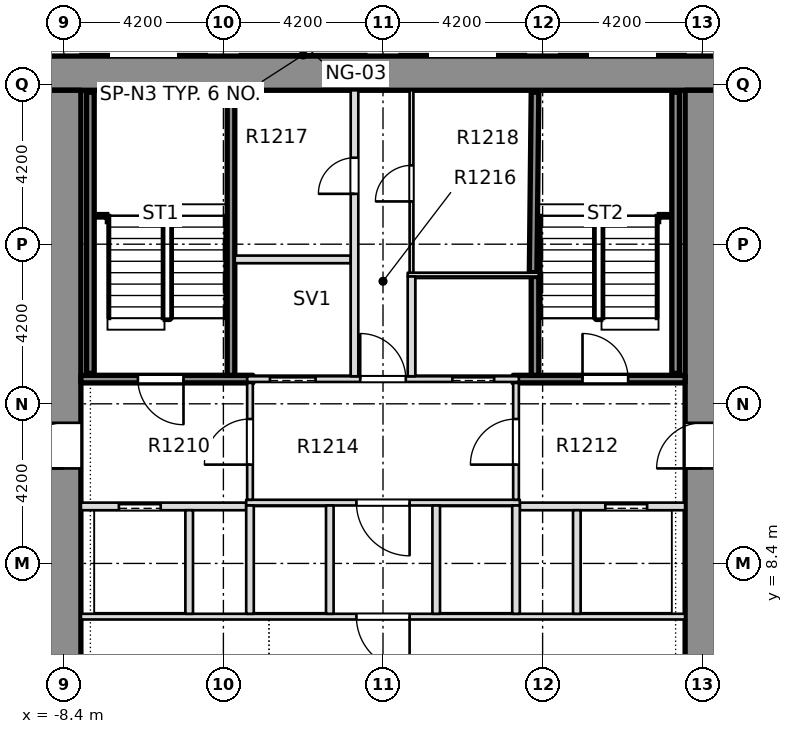
"""IFC4 building model, lengths in metres.
Left out: names, types, materials, properties, quantities, classifications, styles, units other than length and angle.
Written with IfcOpenShell. Run it as: python <this file> out.ifc"""

import sys

from ifc_helpers import new_model, si_unit, direction, frame, frame_2d, origin, place, context, subcontext, project, spatial, rectangle, extrude, element, fill, save


model = new_model("IFC4")
c1 = context("Model", 3, precision=1e-05, world=origin(), true_north=direction((0.0, 1.0)))
c2 = subcontext(c1, "Body", "Model", "MODEL_VIEW")
j1 = project(units=[si_unit("LENGTHUNIT", "METRE"), si_unit("PLANEANGLEUNIT", "RADIAN")], contexts=[c1])
p1 = place(None, origin())
s1 = spatial("IfcSite", under=j1, at=p1, CompositionType="ELEMENT")
p2 = place(p1, origin())
s2 = spatial("IfcBuilding", under=s1, at=p2, CompositionType="ELEMENT")
p3 = place(p2, frame((0.0, 0.0, 55.2)))
s3 = spatial("IfcBuildingStorey", under=s2, at=p3, CompositionType="ELEMENT", Elevation=55.2)
p4 = place(p3, frame((-11.7, 21.3, -0.32), z_axis=(0.0, 0.0, 1.0), x_axis=(1.0, 0.0, 0.0)))
e1 = element("IfcWall", 1, at=p4, inside=s3, PredefinedType="SOLIDWALL", context=c2, shape_type="SweptSolid", body=[
    extrude(rectangle(XDim=23.4, YDim=0.9, at=frame_2d((11.7, 0.0))), origin(), (0.0, 0.0, 1.0), 3.45),
])
p5 = place(p3, frame((-8.4, -7.5, -0.32), z_axis=(0.0, 0.0, 1.0), x_axis=(0.0, 1.0, 0.0)))
e2 = element("IfcWall", 2, at=p5, inside=s3, PredefinedType="SHEAR", context=c2, shape_type="SweptSolid", body=[
    extrude(rectangle(XDim=28.35, YDim=0.9, at=frame_2d((14.175, 0.0))), origin(), (0.0, 0.0, 1.0), 3.45),
])
p6 = place(p5, frame((18.4, 0.0, 0.32)))
e3 = element("IfcOpeningElement", 3, at=p6, cuts=e2, PredefinedType="OPENING", context=c2, shape_type="SweptSolid", body=[
    extrude(rectangle(XDim=1.2, YDim=2.1, at=frame_2d((0.6, 1.05))), frame((0.0, 0.46, 0.0), z_axis=(0.0, -1.0, 0.0), x_axis=(1.0, 0.0, 0.0)), (0.0, 0.0, 1.0), 0.92),
])
p7 = place(p3, frame((8.4, -7.5, -0.32), z_axis=(0.0, 0.0, 1.0), x_axis=(0.0, 1.0, 0.0)))
e4 = element("IfcWall", 4, at=p7, inside=s3, PredefinedType="SHEAR", context=c2, shape_type="SweptSolid", body=[
    extrude(rectangle(XDim=28.35, YDim=0.9, at=frame_2d((14.175, 0.0))), origin(), (0.0, 0.0, 1.0), 3.45),
])
p8 = place(p7, frame((18.4, 0.0, 0.32)))
e5 = element("IfcOpeningElement", 5, at=p8, cuts=e4, PredefinedType="OPENING", context=c2, shape_type="SweptSolid", body=[
    extrude(rectangle(XDim=1.2, YDim=2.1, at=frame_2d((0.6, 1.05))), frame((0.0, 0.46, 0.0), z_axis=(0.0, -1.0, 0.0), x_axis=(1.0, 0.0, 0.0)), (0.0, 0.0, 1.0), 0.92),
])
p9 = place(p3, frame((-7.949, 7.0, 0.0), z_axis=(0.0, 0.0, 1.0), x_axis=(1.0, 0.0, 0.0)))
e6 = element("IfcWall", 6, at=p9, inside=s3, PredefinedType="PARTITIONING", context=c2, shape_type="SweptSolid", body=[
    extrude(rectangle(XDim=15.898, YDim=0.15, at=frame_2d((7.949, 0.0))), origin(), (0.0, 0.0, 1.0), 3.13),
])
p10 = place(p9, frame((7.249, 0.0, 0.0)))
e7 = element("IfcOpeningElement", 7, at=p10, cuts=e6, PredefinedType="OPENING", context=c2, shape_type="SweptSolid", body=[
    extrude(rectangle(XDim=1.4, YDim=2.1, at=frame_2d((0.7, 1.05))), frame((0.0, 0.085, 0.0), z_axis=(0.0, -1.0, 0.0), x_axis=(1.0, 0.0, 0.0)), (0.0, 0.0, 1.0), 0.17),
])
p11 = place(p3, frame((-7.949, 9.9, 0.0), z_axis=(0.0, 0.0, 1.0), x_axis=(1.0, 0.0, 0.0)))
e8 = element("IfcWall", 8, at=p11, inside=s3, PredefinedType="PARTITIONING", context=c2, shape_type="SweptSolid", body=[
    extrude(rectangle(XDim=4.349, YDim=0.2, at=frame_2d((2.174, 0.0))), origin(), (0.0, 0.0, 1.0), 3.13),
])
p12 = place(p11, frame((0.999, 0.0, 0.0)))
e9 = element("IfcOpeningElement", 9, at=p12, cuts=e8, PredefinedType="OPENING", context=c2, shape_type="SweptSolid", body=[
    extrude(rectangle(XDim=1.1, YDim=2.1, at=frame_2d((0.55, 1.05))), frame((0.0, 0.11, 0.0), z_axis=(0.0, -1.0, 0.0), x_axis=(1.0, 0.0, 0.0)), (0.0, 0.0, 1.0), 0.22),
])
p13 = place(p3, frame((3.6, 9.9, 0.0), z_axis=(0.0, 0.0, 1.0), x_axis=(1.0, 0.0, 0.0)))
e10 = element("IfcWall", 10, at=p13, inside=s3, PredefinedType="PARTITIONING", context=c2, shape_type="SweptSolid", body=[
    extrude(rectangle(XDim=4.349, YDim=0.2, at=frame_2d((2.174, 0.0))), origin(), (0.0, 0.0, 1.0), 3.13),
])
p14 = place(p13, frame((2.25, 0.0, 0.0)))
e11 = element("IfcOpeningElement", 11, at=p14, cuts=e10, PredefinedType="OPENING", context=c2, shape_type="SweptSolid", body=[
    extrude(rectangle(XDim=1.1, YDim=2.1, at=frame_2d((0.55, 1.05))), frame((0.0, 0.11, 0.0), z_axis=(0.0, -1.0, 0.0), x_axis=(1.0, 0.0, 0.0)), (0.0, 0.0, 1.0), 0.22),
])
p15 = place(p3, frame((-3.6, 10.0, 0.0), z_axis=(0.0, 0.0, 1.0), x_axis=(1.0, 0.0, 0.0)))
e12 = element("IfcWall", 12, at=p15, inside=s3, PredefinedType="PARTITIONING", context=c2, shape_type="SweptSolid", body=[
    extrude(rectangle(XDim=7.2, YDim=0.15, at=frame_2d((3.6, 0.0))), origin(), (0.0, 0.0, 1.0), 3.13),
])
p16 = place(p15, frame((2.9, 0.0, 0.0)))
e13 = element("IfcOpeningElement", 13, at=p16, cuts=e12, PredefinedType="OPENING", context=c2, shape_type="SweptSolid", body=[
    extrude(rectangle(XDim=1.4, YDim=2.1, at=frame_2d((0.7, 1.05))), frame((0.0, 0.085, 0.0), z_axis=(0.0, -1.0, 0.0), x_axis=(1.0, 0.0, 0.0)), (0.0, 0.0, 1.0), 0.17),
])
p17 = place(p3, frame((-7.949, 13.25, 0.0), z_axis=(0.0, 0.0, 1.0), x_axis=(1.0, 0.0, 0.0)))
e14 = element("IfcWall", 14, at=p17, inside=s3, PredefinedType="SOLIDWALL", context=c2, shape_type="SweptSolid", body=[
    extrude(rectangle(XDim=4.524, YDim=0.2, at=frame_2d((2.262, 0.0))), origin(), (0.0, 0.0, 1.0), 3.13),
])
p18 = place(p17, frame((1.499, 0.0, 0.0)))
e15 = element("IfcOpeningElement", 15, at=p18, cuts=e14, PredefinedType="OPENING", context=c2, shape_type="SweptSolid", body=[
    extrude(rectangle(XDim=1.2, YDim=2.1, at=frame_2d((0.6, 1.05))), frame((0.0, 0.11, 0.0), z_axis=(0.0, -1.0, 0.0), x_axis=(1.0, 0.0, 0.0)), (0.0, 0.0, 1.0), 0.22),
])
p19 = place(p3, frame((-3.575, 13.25, 0.0), z_axis=(0.0, 0.0, 1.0), x_axis=(1.0, 0.0, 0.0)))
e16 = element("IfcWall", 16, at=p19, inside=s3, PredefinedType="PARTITIONING", context=c2, shape_type="SweptSolid", body=[
    extrude(rectangle(XDim=7.15, YDim=0.15, at=frame_2d((3.575, 0.0))), origin(), (0.0, 0.0, 1.0), 3.13),
])
p20 = place(p19, frame((0.6, 0.0, 0.0)))
e17 = element("IfcOpeningElement", 17, at=p20, cuts=e16, PredefinedType="OPENING", context=c2, shape_type="SweptSolid", body=[
    extrude(rectangle(XDim=1.2, YDim=2.1, at=frame_2d((0.6, 1.05))), frame((0.0, 0.085, 0.0), z_axis=(0.0, -1.0, 0.0), x_axis=(1.0, 0.0, 0.0)), (0.0, 0.0, 1.0), 0.17),
])
p21 = place(p19, frame((5.4, 0.0, 0.0)))
e18 = element("IfcOpeningElement", 18, at=p21, cuts=e16, PredefinedType="OPENING", context=c2, shape_type="SweptSolid", body=[
    extrude(rectangle(XDim=1.1, YDim=2.1, at=frame_2d((0.55, 1.05))), frame((0.0, 0.085, 0.0), z_axis=(0.0, -1.0, 0.0), x_axis=(1.0, 0.0, 0.0)), (0.0, 0.0, 1.0), 0.17),
])
p22 = place(p19, frame((2.975, 0.0, 0.0)))
e19 = element("IfcOpeningElement", 19, at=p22, cuts=e16, PredefinedType="OPENING", context=c2, shape_type="SweptSolid", body=[
    extrude(rectangle(XDim=1.2, YDim=2.1, at=frame_2d((0.6, 1.05))), frame((0.0, 0.085, 0.0), z_axis=(0.0, -1.0, 0.0), x_axis=(1.0, 0.0, 0.0)), (0.0, 0.0, 1.0), 0.17),
])
p23 = place(p3, frame((3.425, 13.25, 0.0), z_axis=(0.0, 0.0, 1.0), x_axis=(1.0, 0.0, 0.0)))
e20 = element("IfcWall", 20, at=p23, inside=s3, PredefinedType="SOLIDWALL", context=c2, shape_type="SweptSolid", body=[
    extrude(rectangle(XDim=4.524, YDim=0.2, at=frame_2d((2.262, 0.0))), origin(), (0.0, 0.0, 1.0), 3.13),
])
p24 = place(p23, frame((1.825, 0.0, 0.0)))
e21 = element("IfcOpeningElement", 21, at=p24, cuts=e20, PredefinedType="OPENING", context=c2, shape_type="SweptSolid", body=[
    extrude(rectangle(XDim=1.2, YDim=2.1, at=frame_2d((0.6, 1.05))), frame((0.0, 0.11, 0.0), z_axis=(0.0, -1.0, 0.0), x_axis=(1.0, 0.0, 0.0)), (0.0, 0.0, 1.0), 0.22),
])
p25 = place(p3, frame((0.65, 16.0, 0.0), z_axis=(0.0, 0.0, 1.0), x_axis=(1.0, 0.0, 0.0)))
e22 = element("IfcWall", 22, at=p25, inside=s3, PredefinedType="PARTITIONING", context=c2, shape_type="SweptSolid", body=[
    extrude(rectangle(XDim=3.45, YDim=0.1, at=frame_2d((1.725, 0.0))), origin(), (0.0, 0.0, 1.0), 3.13),
])
p26 = place(p3, frame((-3.9, 16.4, 0.0), z_axis=(0.0, 0.0, 1.0), x_axis=(1.0, 0.0, 0.0)))
e23 = element("IfcWall", 23, at=p26, inside=s3, PredefinedType="PARTITIONING", context=c2, shape_type="SweptSolid", body=[
    extrude(rectangle(XDim=3.05, YDim=0.2, at=frame_2d((1.525, 0.0))), origin(), (0.0, 0.0, 1.0), 3.13),
])
p27 = place(p3, frame((-5.1, 7.075, 0.0), z_axis=(0.0, 0.0, 1.0), x_axis=(0.0, 1.0, 0.0)))
e24 = element("IfcWall", 24, at=p27, inside=s3, PredefinedType="PARTITIONING", context=c2, shape_type="SweptSolid", body=[
    extrude(rectangle(XDim=2.725, YDim=0.2, at=frame_2d((1.363, 0.0))), origin(), (0.0, 0.0, 1.0), 3.13),
])
p28 = place(p3, frame((-4.0, 13.35, 0.0), z_axis=(0.0, 0.0, 1.0), x_axis=(0.0, 1.0, 0.0)))
e25 = element("IfcWall", 25, at=p28, inside=s3, PredefinedType="SOLIDWALL", context=c2, shape_type="SweptSolid", body=[
    extrude(rectangle(XDim=7.499, YDim=0.2, at=frame_2d((3.75, 0.0))), origin(), (0.0, 0.0, 1.0), 3.13),
])
p29 = place(p3, frame((-3.5, 7.075, 0.0), z_axis=(0.0, 0.0, 1.0), x_axis=(0.0, 1.0, 0.0)))
e26 = element("IfcWall", 26, at=p29, inside=s3, PredefinedType="PARTITIONING", context=c2, shape_type="SweptSolid", body=[
    extrude(rectangle(XDim=2.85, YDim=0.2, at=frame_2d((1.425, 0.0))), origin(), (0.0, 0.0, 1.0), 3.13),
])
p30 = place(p3, frame((-3.5, 10.075, 0.0), z_axis=(0.0, 0.0, 1.0), x_axis=(0.0, 1.0, 0.0)))
e27 = element("IfcWall", 27, at=p30, inside=s3, PredefinedType="PARTITIONING", context=c2, shape_type="SweptSolid", body=[
    extrude(rectangle(XDim=3.075, YDim=0.15, at=frame_2d((1.538, 0.0))), origin(), (0.0, 0.0, 1.0), 3.13),
])
p31 = place(p30, frame((0.925, 0.0, 0.0)))
e28 = element("IfcOpeningElement", 28, at=p31, cuts=e27, PredefinedType="OPENING", context=c2, shape_type="SweptSolid", body=[
    extrude(rectangle(XDim=1.2, YDim=2.1, at=frame_2d((0.6, 1.05))), frame((0.0, 0.085, 0.0), z_axis=(0.0, -1.0, 0.0), x_axis=(1.0, 0.0, 0.0)), (0.0, 0.0, 1.0), 0.17),
])
p32 = place(p3, frame((-1.4, 7.075, 0.0), z_axis=(0.0, 0.0, 1.0), x_axis=(0.0, 1.0, 0.0)))
e29 = element("IfcWall", 29, at=p32, inside=s3, PredefinedType="PARTITIONING", context=c2, shape_type="SweptSolid", body=[
    extrude(rectangle(XDim=2.85, YDim=0.2, at=frame_2d((1.425, 0.0))), origin(), (0.0, 0.0, 1.0), 3.13),
])
p33 = place(p3, frame((-0.75, 13.325, 0.0), z_axis=(0.0, 0.0, 1.0), x_axis=(0.0, 1.0, 0.0)))
e30 = element("IfcWall", 30, at=p33, inside=s3, PredefinedType="PARTITIONING", context=c2, shape_type="SweptSolid", body=[
    extrude(rectangle(XDim=7.524, YDim=0.2, at=frame_2d((3.762, 0.0))), origin(), (0.0, 0.0, 1.0), 3.13),
])
p34 = place(p33, frame((4.8, 0.0, 0.0)))
e31 = element("IfcOpeningElement", 31, at=p34, cuts=e30, PredefinedType="OPENING", context=c2, shape_type="SweptSolid", body=[
    extrude(rectangle(XDim=0.95, YDim=2.1, at=frame_2d((0.475, 1.05))), frame((0.0, 0.11, 0.0), z_axis=(0.0, -1.0, 0.0), x_axis=(1.0, 0.0, 0.0)), (0.0, 0.0, 1.0), 0.22),
])
p35 = place(p3, frame((0.75, 13.325, 0.0), z_axis=(0.0, 0.0, 1.0), x_axis=(0.0, 1.0, 0.0)))
e32 = element("IfcWall", 32, at=p35, inside=s3, PredefinedType="PARTITIONING", context=c2, shape_type="SweptSolid", body=[
    extrude(rectangle(XDim=2.625, YDim=0.2, at=frame_2d((1.312, 0.0))), origin(), (0.0, 0.0, 1.0), 3.13),
])
p36 = place(p3, frame((0.75, 16.05, 0.0), z_axis=(0.0, 0.0, 1.0), x_axis=(0.0, 1.0, 0.0)))
e33 = element("IfcWall", 33, at=p36, inside=s3, PredefinedType="PARTITIONING", context=c2, shape_type="SweptSolid", body=[
    extrude(rectangle(XDim=4.799, YDim=0.1, at=frame_2d((2.399, 0.0))), origin(), (0.0, 0.0, 1.0), 3.13),
])
p37 = place(p36, frame((1.875, 0.0, 0.0)))
e34 = element("IfcOpeningElement", 34, at=p37, cuts=e33, PredefinedType="OPENING", context=c2, shape_type="SweptSolid", body=[
    extrude(rectangle(XDim=0.95, YDim=2.1, at=frame_2d((0.475, 1.05))), frame((0.0, 0.06, 0.0), z_axis=(0.0, -1.0, 0.0), x_axis=(1.0, 0.0, 0.0)), (0.0, 0.0, 1.0), 0.12),
])
for number, where, z_axis, x_axis in (
    (35, (1.4, 7.075, 0.0), (0.0, 0.0, 1.0), (0.0, 1.0, 0.0)),
    (36, (3.5, 7.075, 0.0), (0.0, 0.0, 1.0), (0.0, 1.0, 0.0)),
):
    element("IfcWall", number, at=place(p3, frame(where, z_axis=z_axis, x_axis=x_axis)), inside=s3, PredefinedType="PARTITIONING", context=c2, shape_type="SweptSolid", body=[
        extrude(rectangle(XDim=2.85, YDim=0.2, at=frame_2d((1.425, 0.0))), origin(), (0.0, 0.0, 1.0), 3.13),
    ])
p38 = place(p3, frame((3.5, 10.075, 0.0), z_axis=(0.0, 0.0, 1.0), x_axis=(0.0, 1.0, 0.0)))
e37 = element("IfcWall", 37, at=p38, inside=s3, PredefinedType="PARTITIONING", context=c2, shape_type="SweptSolid", body=[
    extrude(rectangle(XDim=3.075, YDim=0.15, at=frame_2d((1.538, 0.0))), origin(), (0.0, 0.0, 1.0), 3.13),
])
p39 = place(p38, frame((0.925, 0.0, 0.0)))
e38 = element("IfcOpeningElement", 38, at=p39, cuts=e37, PredefinedType="OPENING", context=c2, shape_type="SweptSolid", body=[
    extrude(rectangle(XDim=1.2, YDim=2.1, at=frame_2d((0.6, 1.05))), frame((0.0, 0.085, 0.0), z_axis=(0.0, -1.0, 0.0), x_axis=(1.0, 0.0, 0.0)), (0.0, 0.0, 1.0), 0.17),
])
p40 = place(p3, frame((4.0, 13.35, 0.0), z_axis=(0.0, 0.0, 1.0), x_axis=(0.0, 1.0, 0.0)))
e39 = element("IfcWall", 39, at=p40, inside=s3, PredefinedType="SOLIDWALL", context=c2, shape_type="SweptSolid", body=[
    extrude(rectangle(XDim=2.6, YDim=0.2, at=frame_2d((1.3, 0.0))), origin(), (0.0, 0.0, 1.0), 3.13),
])
p41 = place(p3, frame((3.95, 16.05, 0.0), z_axis=(0.0, 0.0, 1.0), x_axis=(0.010538176883, 0.999944471872, 0.0)))
e40 = element("IfcWall", 40, at=p41, inside=s3, PredefinedType="SOLIDWALL", context=c2, shape_type="SweptSolid", body=[
    extrude(rectangle(XDim=4.749, YDim=0.2, at=frame_2d((2.375, 0.0))), origin(), (0.0, 0.0, 1.0), 3.13),
])
p42 = place(p3, frame((5.1, 7.075, 0.0), z_axis=(0.0, 0.0, 1.0), x_axis=(0.0, 1.0, 0.0)))
e41 = element("IfcWall", 41, at=p42, inside=s3, PredefinedType="PARTITIONING", context=c2, shape_type="SweptSolid", body=[
    extrude(rectangle(XDim=2.725, YDim=0.2, at=frame_2d((1.363, 0.0))), origin(), (0.0, 0.0, 1.0), 3.13),
])
for number, where, z_axis, x_axis in (
    (42, (-7.7, 13.4, 0.0), (0.0, 0.0, 1.0), (0.0, 1.0, 0.0)),
    (43, (7.7, 13.4, 0.0), (0.0, 0.0, 1.0), (0.0, 1.0, 0.0)),
):
    element("IfcWall", number, at=place(p3, frame(where, z_axis=z_axis, x_axis=x_axis)), inside=s3, PredefinedType="SOLIDWALL", context=c2, shape_type="SweptSolid", body=[
        extrude(rectangle(XDim=7.4, YDim=0.2, at=frame_2d((3.7, 0.0))), origin(), (0.0, 0.0, 1.0), 3.13),
    ])
p43 = place(p18, origin())
e44 = element("IfcDoor", 44, at=p43, inside=s3, OperationType="SINGLE_SWING_LEFT", PredefinedType="DOOR", context=c2, shape_type="SweptSolid", body=[
    extrude(rectangle(XDim=1.2, YDim=2.1, at=frame_2d((0.6, 1.05))), frame((0.0, 0.025, 0.0), z_axis=(0.0, -1.0, 0.0), x_axis=(1.0, 0.0, 0.0)), (0.0, 0.0, 1.0), 0.05),
])
fill(e15, e44)
p44 = place(p12, origin())
e45 = element("IfcDoor", 45, at=p44, inside=s3, OperationType="SLIDING_TO_RIGHT", PredefinedType="DOOR", context=c2, shape_type="SweptSolid", body=[
    extrude(rectangle(XDim=1.1, YDim=2.1, at=frame_2d((0.55, 1.05))), frame((0.0, 0.025, 0.0), z_axis=(0.0, -1.0, 0.0), x_axis=(1.0, 0.0, 0.0)), (0.0, 0.0, 1.0), 0.05),
])
fill(e9, e45)
p45 = place(p24, origin())
e46 = element("IfcDoor", 46, at=p45, inside=s3, OperationType="SINGLE_SWING_RIGHT", PredefinedType="DOOR", context=c2, shape_type="SweptSolid", body=[
    extrude(rectangle(XDim=1.2, YDim=2.1, at=frame_2d((0.6, 1.05))), frame((0.0, 0.025, 0.0), z_axis=(0.0, -1.0, 0.0), x_axis=(1.0, 0.0, 0.0)), (0.0, 0.0, 1.0), 0.05),
])
fill(e21, e46)
p46 = place(p14, origin())
e47 = element("IfcDoor", 47, at=p46, inside=s3, OperationType="SLIDING_TO_LEFT", PredefinedType="DOOR", context=c2, shape_type="SweptSolid", body=[
    extrude(rectangle(XDim=1.1, YDim=2.1, at=frame_2d((0.55, 1.05))), frame((0.0, 0.025, 0.0), z_axis=(0.0, -1.0, 0.0), x_axis=(1.0, 0.0, 0.0)), (0.0, 0.0, 1.0), 0.05),
])
fill(e11, e47)
p47 = place(p10, origin())
e48 = element("IfcDoor", 48, at=p47, inside=s3, OperationType="SINGLE_SWING_RIGHT", PredefinedType="DOOR", context=c2, shape_type="SweptSolid", body=[
    extrude(rectangle(XDim=1.4, YDim=2.1, at=frame_2d((0.7, 1.05))), frame((0.0, 0.025, 0.0), z_axis=(0.0, -1.0, 0.0), x_axis=(1.0, 0.0, 0.0)), (0.0, 0.0, 1.0), 0.05),
])
fill(e7, e48)
p48 = place(p16, origin())
e49 = element("IfcDoor", 49, at=p48, inside=s3, OperationType="SINGLE_SWING_RIGHT", PredefinedType="DOOR", context=c2, shape_type="SweptSolid", body=[
    extrude(rectangle(XDim=1.4, YDim=2.1, at=frame_2d((0.7, 1.05))), frame((0.0, 0.025, 0.0), z_axis=(0.0, -1.0, 0.0), x_axis=(1.0, 0.0, 0.0)), (0.0, 0.0, 1.0), 0.05),
])
fill(e13, e49)
p49 = place(p20, origin())
e50 = element("IfcDoor", 50, at=p49, inside=s3, OperationType="SLIDING_TO_RIGHT", PredefinedType="DOOR", context=c2, shape_type="SweptSolid", body=[
    extrude(rectangle(XDim=1.2, YDim=2.1, at=frame_2d((0.6, 1.05))), frame((0.0, 0.025, 0.0), z_axis=(0.0, -1.0, 0.0), x_axis=(1.0, 0.0, 0.0)), (0.0, 0.0, 1.0), 0.05),
])
fill(e17, e50)
p50 = place(p21, origin())
e51 = element("IfcDoor", 51, at=p50, inside=s3, OperationType="SLIDING_TO_LEFT", PredefinedType="DOOR", context=c2, shape_type="SweptSolid", body=[
    extrude(rectangle(XDim=1.1, YDim=2.1, at=frame_2d((0.55, 1.05))), frame((0.0, 0.025, 0.0), z_axis=(0.0, -1.0, 0.0), x_axis=(1.0, 0.0, 0.0)), (0.0, 0.0, 1.0), 0.05),
])
fill(e18, e51)
p51 = place(p22, origin())
e52 = element("IfcDoor", 52, at=p51, inside=s3, OperationType="SINGLE_SWING_RIGHT", PredefinedType="DOOR", context=c2, shape_type="SweptSolid", body=[
    extrude(rectangle(XDim=1.2, YDim=2.1, at=frame_2d((0.6, 1.05))), frame((0.0, 0.025, 0.0), z_axis=(0.0, -1.0, 0.0), x_axis=(1.0, 0.0, 0.0)), (0.0, 0.0, 1.0), 0.05),
])
fill(e19, e52)
p52 = place(p34, origin())
e53 = element("IfcDoor", 53, at=p52, inside=s3, OperationType="SINGLE_SWING_RIGHT", PredefinedType="DOOR", context=c2, shape_type="SweptSolid", body=[
    extrude(rectangle(XDim=0.95, YDim=2.1, at=frame_2d((0.475, 1.05))), frame((0.0, 0.025, 0.0), z_axis=(0.0, -1.0, 0.0), x_axis=(1.0, 0.0, 0.0)), (0.0, 0.0, 1.0), 0.05),
])
fill(e31, e53)
p53 = place(p37, origin())
e54 = element("IfcDoor", 54, at=p53, inside=s3, OperationType="SINGLE_SWING_LEFT", PredefinedType="DOOR", context=c2, shape_type="SweptSolid", body=[
    extrude(rectangle(XDim=0.95, YDim=2.1, at=frame_2d((0.475, 1.05))), frame((0.0, 0.025, 0.0), z_axis=(0.0, -1.0, 0.0), x_axis=(1.0, 0.0, 0.0)), (0.0, 0.0, 1.0), 0.05),
])
fill(e34, e54)
p54 = place(p31, origin())
e55 = element("IfcDoor", 55, at=p54, inside=s3, OperationType="SINGLE_SWING_RIGHT", PredefinedType="DOOR", context=c2, shape_type="SweptSolid", body=[
    extrude(rectangle(XDim=1.2, YDim=2.1, at=frame_2d((0.6, 1.05))), frame((0.0, 0.025, 0.0), z_axis=(0.0, -1.0, 0.0), x_axis=(1.0, 0.0, 0.0)), (0.0, 0.0, 1.0), 0.05),
])
fill(e28, e55)
p55 = place(p39, origin())
e56 = element("IfcDoor", 56, at=p55, inside=s3, OperationType="SINGLE_SWING_LEFT", PredefinedType="DOOR", context=c2, shape_type="SweptSolid", body=[
    extrude(rectangle(XDim=1.2, YDim=2.1, at=frame_2d((0.6, 1.05))), frame((0.0, 0.025, 0.0), z_axis=(0.0, -1.0, 0.0), x_axis=(1.0, 0.0, 0.0)), (0.0, 0.0, 1.0), 0.05),
])
fill(e38, e56)
p56 = place(p6, origin())
e57 = element("IfcDoor", 57, at=p56, inside=s3, OperationType="SINGLE_SWING_LEFT", PredefinedType="DOOR", context=c2, shape_type="SweptSolid", body=[
    extrude(rectangle(XDim=1.2, YDim=2.1, at=frame_2d((0.6, 1.05))), frame((0.0, 0.025, 0.0), z_axis=(0.0, -1.0, 0.0), x_axis=(1.0, 0.0, 0.0)), (0.0, 0.0, 1.0), 0.05),
])
fill(e3, e57)
p57 = place(p8, origin())
e58 = element("IfcDoor", 58, at=p57, inside=s3, OperationType="SINGLE_SWING_LEFT", PredefinedType="DOOR", context=c2, shape_type="SweptSolid", body=[
    extrude(rectangle(XDim=1.2, YDim=2.1, at=frame_2d((0.6, 1.05))), frame((0.0, 0.025, 0.0), z_axis=(0.0, -1.0, 0.0), x_axis=(1.0, 0.0, 0.0)), (0.0, 0.0, 1.0), 0.05),
])
fill(e5, e58)
save(model, sys.argv[1])
